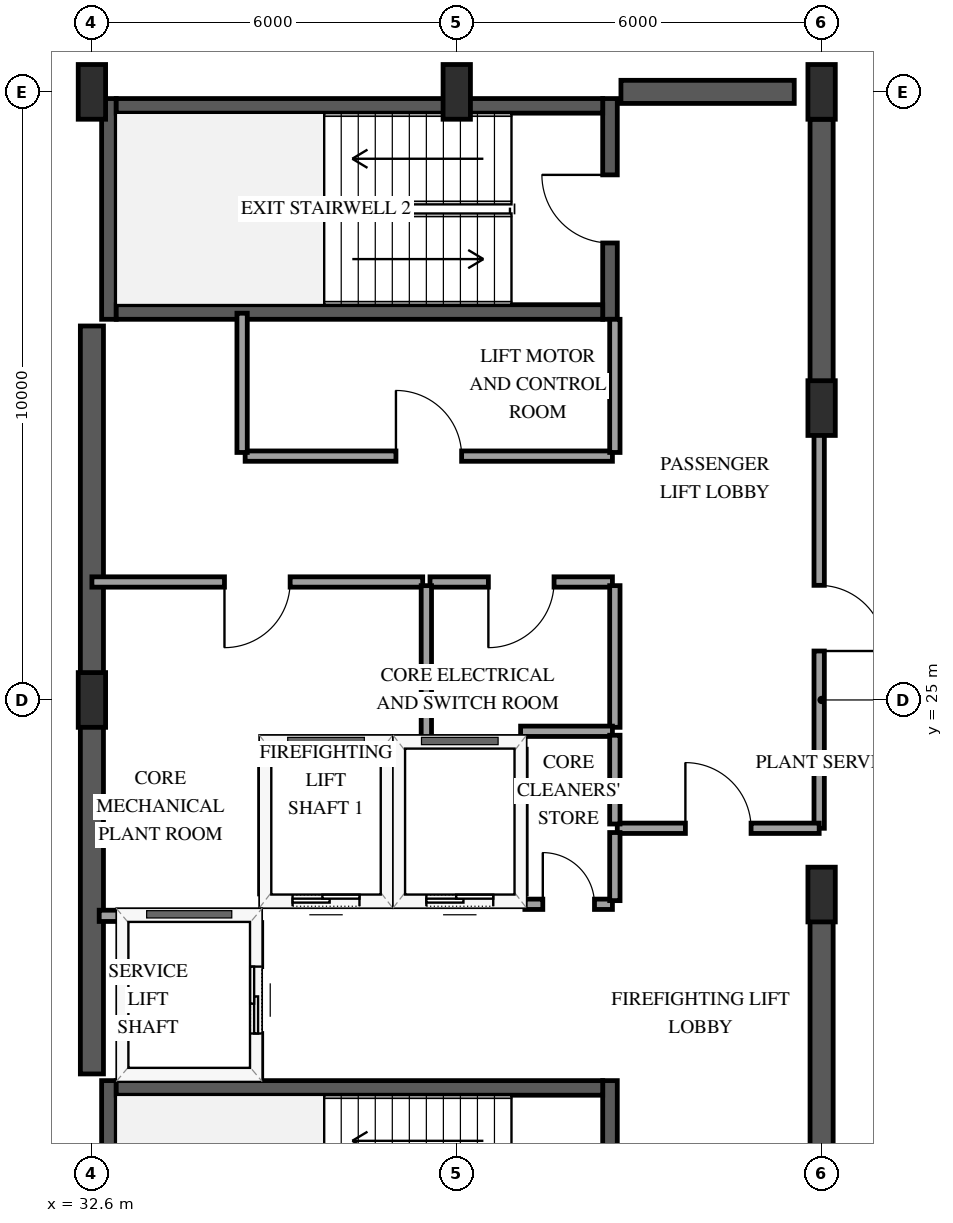
"""IFC4 building model, lengths in metres.
Left out: names, types, materials, properties, quantities, classifications, styles, units other than length and angle.
Written with IfcOpenShell. Run it as: python <this file> out.ifc"""

import sys

from ifc_helpers import new_model, si_unit, direction, frame, frame_2d, origin, origin_2d, place, context, subcontext, project, spatial, rectangle, extrude, element, fill, save


model = new_model("IFC4")
c1 = context("Model", 3, precision=1e-05, world=origin(), true_north=direction((0.0, 1.0)))
c2 = subcontext(c1, "Body", "Model", "MODEL_VIEW")
j1 = project(units=[si_unit("LENGTHUNIT", "METRE"), si_unit("PLANEANGLEUNIT", "RADIAN")], contexts=[c1])
p1 = place(None, origin())
s1 = spatial("IfcSite", under=j1, at=p1, CompositionType="ELEMENT")
p2 = place(p1, origin())
s2 = spatial("IfcBuilding", under=s1, at=p2, CompositionType="ELEMENT")
p3 = place(p2, frame((0.0, 0.0, 305.65)))
s3 = spatial("IfcBuildingStorey", under=s2, at=p3, CompositionType="ELEMENT", Elevation=305.65)
p4 = place(p3, frame((32.88, 15.11, 0.0), z_axis=(0.0, 0.0, 1.0), x_axis=(0.0, 1.0, 0.0)))
e1 = element("IfcWall", 1, at=p4, inside=s3, PredefinedType="SHEAR", context=c2, shape_type="SweptSolid", body=[
    extrude(rectangle(XDim=3.63, YDim=0.24, at=frame_2d((1.815, 0.0))), origin(), (0.0, 0.0, 1.0), 4.2),
])
p5 = place(p3, frame((41.12, 15.11, 0.0), z_axis=(0.0, 0.0, 1.0), x_axis=(0.0, 1.0, 0.0)))
e2 = element("IfcWall", 2, at=p5, inside=s3, PredefinedType="SHEAR", context=c2, shape_type="SweptSolid", body=[
    extrude(rectangle(XDim=3.63, YDim=0.24, at=frame_2d((1.815, 0.0))), origin(), (0.0, 0.0, 1.0), 4.2),
])
p6 = place(p5, frame((1.255, 0.0, 0.0)))
e3 = element("IfcOpeningElement", 3, at=p6, cuts=e2, PredefinedType="OPENING", context=c2, shape_type="SweptSolid", body=[
    extrude(rectangle(XDim=1.12, YDim=2.15, at=frame_2d((0.56, 1.075))), frame((0.0, 0.13, 0.0), z_axis=(0.0, -1.0, 0.0), x_axis=(1.0, 0.0, 0.0)), (0.0, 0.0, 1.0), 0.26),
])
p7 = place(p3, frame((33.0, 18.62, 0.0), z_axis=(0.0, 0.0, 1.0), x_axis=(1.0, 0.0, 0.0)))
e4 = element("IfcWall", 4, at=p7, inside=s3, PredefinedType="SHEAR", context=c2, shape_type="SweptSolid", body=[
    extrude(rectangle(XDim=8.0, YDim=0.24, at=frame_2d((4.0, 0.0))), origin(), (0.0, 0.0, 1.0), 4.2),
])
p8 = place(p3, frame((32.88, 31.26, 0.0), z_axis=(0.0, 0.0, 1.0), x_axis=(0.0, 1.0, 0.0)))
e5 = element("IfcWall", 5, at=p8, inside=s3, PredefinedType="SHEAR", context=c2, shape_type="SweptSolid", body=[
    extrude(rectangle(XDim=3.63, YDim=0.24, at=frame_2d((1.815, 0.0))), origin(), (0.0, 0.0, 1.0), 4.2),
])
p9 = place(p3, frame((41.12, 31.26, 0.0), z_axis=(0.0, 0.0, 1.0), x_axis=(0.0, 1.0, 0.0)))
e6 = element("IfcWall", 6, at=p9, inside=s3, PredefinedType="SHEAR", context=c2, shape_type="SweptSolid", body=[
    extrude(rectangle(XDim=3.63, YDim=0.24, at=frame_2d((1.815, 0.0))), origin(), (0.0, 0.0, 1.0), 4.2),
])
p10 = place(p9, frame((1.255, 0.0, 0.0)))
e7 = element("IfcOpeningElement", 7, at=p10, cuts=e6, PredefinedType="OPENING", context=c2, shape_type="SweptSolid", body=[
    extrude(rectangle(XDim=1.12, YDim=2.15, at=frame_2d((0.56, 1.075))), frame((0.0, 0.13, 0.0), z_axis=(0.0, -1.0, 0.0), x_axis=(1.0, 0.0, 0.0)), (0.0, 0.0, 1.0), 0.26),
])
for number, where, z_axis, x_axis in (
    (8, (33.0, 31.38, 0.0), (0.0, 0.0, 1.0), (1.0, 0.0, 0.0)),
    (9, (33.0, 34.77, 0.0), (0.0, 0.0, 1.0), (1.0, 0.0, 0.0)),
):
    element("IfcWall", number, at=place(p3, frame(where, z_axis=z_axis, x_axis=x_axis)), inside=s3, PredefinedType="SHEAR", context=c2, shape_type="SweptSolid", body=[
        extrude(rectangle(XDim=8.0, YDim=0.24, at=frame_2d((4.0, 0.0))), origin(), (0.0, 0.0, 1.0), 4.2),
    ])
p11 = place(p3, frame((32.6, 18.85, 0.0), z_axis=(0.0, 0.0, 1.0), x_axis=(0.0, 1.0, 0.0)))
e10 = element("IfcWall", 10, at=p11, inside=s3, PredefinedType="SHEAR", context=c2, shape_type="SweptSolid", body=[
    extrude(rectangle(XDim=12.3, YDim=0.38, at=frame_2d((6.15, 0.0))), origin(), (0.0, 0.0, 1.0), 4.2),
])
p12 = place(p3, frame((41.3, 35.0, 0.0), z_axis=(0.0, 0.0, 1.0), x_axis=(1.0, 0.0, 0.0)))
e11 = element("IfcWall", 11, at=p12, inside=s3, PredefinedType="SHEAR", context=c2, shape_type="SweptSolid", body=[
    extrude(rectangle(XDim=2.85, YDim=0.38, at=frame_2d((1.425, 0.0))), origin(), (0.0, 0.0, 1.0), 4.2),
])
p13 = place(p3, frame((44.6, 15.45, 0.0), z_axis=(0.0, 0.0, 1.0), x_axis=(0.0, 1.0, 0.0)))
e12 = element("IfcWall", 12, at=p13, inside=s3, PredefinedType="SHEAR", context=c2, shape_type="SweptSolid", body=[
    extrude(rectangle(XDim=6.35, YDim=0.38, at=frame_2d((3.175, 0.0))), origin(), (0.0, 0.0, 1.0), 4.2),
])
p14 = place(p3, frame((44.6, 29.8, 0.0), z_axis=(0.0, 0.0, 1.0), x_axis=(0.0, 1.0, 0.0)))
e13 = element("IfcWall", 13, at=p14, inside=s3, PredefinedType="SHEAR", context=c2, shape_type="SweptSolid", body=[
    extrude(rectangle(XDim=4.75, YDim=0.38, at=frame_2d((2.375, 0.0))), origin(), (0.0, 0.0, 1.0), 4.2),
])
for number, where, z_axis, x_axis in (
    (14, (32.6, 25.0, 0.0), (0.0, 0.0, 1.0), (1.0, 0.0, 0.0)),
    (15, (32.6, 35.0, 0.0), (0.0, 0.0, 1.0), (1.0, 0.0, 0.0)),
    (16, (38.6, 35.0, 0.0), (0.0, 0.0, 1.0), (1.0, 0.0, 0.0)),
    (17, (44.6, 21.8, 0.0), (0.0, 0.0, 1.0), (1.0, 0.0, 0.0)),
    (18, (44.6, 29.8, 0.0), (0.0, 0.0, 1.0), (1.0, 0.0, 0.0)),
    (19, (44.6, 35.0, 0.0), (0.0, 0.0, 1.0), (1.0, 0.0, 0.0)),
):
    element("IfcColumn", number, at=place(p3, frame(where, z_axis=z_axis, x_axis=x_axis)), inside=s3, PredefinedType="PILASTER", context=c2, shape_type="SweptSolid", body=[
        extrude(rectangle(XDim=0.45, YDim=0.9, at=origin_2d()), origin(), (0.0, 0.0, 1.0), 4.2),
    ])
p15 = place(p3, frame((35.103, 39.234, 0.0), z_axis=(0.0, 0.0, 1.0), x_axis=(-0.794007710978, -0.607907686173, 0.0)))
e20 = element("IfcWall", 20, at=p15, inside=s3, PredefinedType="SOLIDWALL", context=c2, shape_type="SweptSolid", body=[
    extrude(rectangle(XDim=6.831, YDim=0.27, at=frame_2d((3.416, 0.0))), origin(), (0.0, 0.0, 1.0), 3.195),
])
p16 = place(p3, frame((35.45, 21.7, 0.0), z_axis=(0.0, 0.0, 1.0), x_axis=(1.0, 0.0, 0.0)))
e21 = element("IfcWall", 21, at=p16, inside=s3, PredefinedType="SOLIDWALL", context=c2, shape_type="SweptSolid", body=[
    extrude(rectangle(XDim=2.0, YDim=0.185, at=frame_2d((1.0, 0.0))), origin(), (0.0, 0.0, 1.0), 3.895),
])
p17 = place(p16, frame((0.45, 0.0, 0.0)))
e22 = element("IfcOpeningElement", 22, at=p17, cuts=e21, PredefinedType="OPENING", context=c2, shape_type="SweptSolid", body=[
    extrude(rectangle(XDim=1.1, YDim=2.15, at=frame_2d((0.55, 1.075))), frame((0.0, 0.103, 0.0), z_axis=(0.0, -1.0, 0.0), x_axis=(1.0, 0.0, 0.0)), (0.0, 0.0, 1.0), 0.205),
])
p18 = place(p3, frame((35.45, 24.3, 0.0), z_axis=(0.0, 0.0, 1.0), x_axis=(1.0, 0.0, 0.0)))
e23 = element("IfcWall", 23, at=p18, inside=s3, PredefinedType="SOLIDWALL", context=c2, shape_type="SweptSolid", body=[
    extrude(rectangle(XDim=2.0, YDim=0.185, at=frame_2d((1.0, 0.0))), origin(), (0.0, 0.0, 1.0), 3.895),
])
for number, where, z_axis, x_axis in (
    (24, (35.45, 21.81, 0.0), (0.0, 0.0, 1.0), (0.0, 1.0, 0.0)),
    (25, (37.45, 21.81, 0.0), (0.0, 0.0, 1.0), (0.0, 1.0, 0.0)),
):
    element("IfcWall", number, at=place(p3, frame(where, z_axis=z_axis, x_axis=x_axis)), inside=s3, PredefinedType="SOLIDWALL", context=c2, shape_type="SweptSolid", body=[
        extrude(rectangle(XDim=2.38, YDim=0.185, at=frame_2d((1.19, 0.0))), origin(), (0.0, 0.0, 1.0), 3.895),
    ])
p19 = place(p3, frame((37.65, 21.7, 0.0), z_axis=(0.0, 0.0, 1.0), x_axis=(1.0, 0.0, 0.0)))
e26 = element("IfcWall", 26, at=p19, inside=s3, PredefinedType="SOLIDWALL", context=c2, shape_type="SweptSolid", body=[
    extrude(rectangle(XDim=2.0, YDim=0.185, at=frame_2d((1.0, 0.0))), origin(), (0.0, 0.0, 1.0), 3.895),
])
p20 = place(p19, frame((0.45, 0.0, 0.0)))
e27 = element("IfcOpeningElement", 27, at=p20, cuts=e26, PredefinedType="OPENING", context=c2, shape_type="SweptSolid", body=[
    extrude(rectangle(XDim=1.1, YDim=2.15, at=frame_2d((0.55, 1.075))), frame((0.0, 0.103, 0.0), z_axis=(0.0, -1.0, 0.0), x_axis=(1.0, 0.0, 0.0)), (0.0, 0.0, 1.0), 0.205),
])
p21 = place(p3, frame((37.65, 24.3, 0.0), z_axis=(0.0, 0.0, 1.0), x_axis=(1.0, 0.0, 0.0)))
e28 = element("IfcWall", 28, at=p21, inside=s3, PredefinedType="SOLIDWALL", context=c2, shape_type="SweptSolid", body=[
    extrude(rectangle(XDim=2.0, YDim=0.185, at=frame_2d((1.0, 0.0))), origin(), (0.0, 0.0, 1.0), 3.895),
])
p22 = place(p3, frame((39.65, 21.81, 0.0), z_axis=(0.0, 0.0, 1.0), x_axis=(0.0, 1.0, 0.0)))
e29 = element("IfcWall", 29, at=p22, inside=s3, PredefinedType="SOLIDWALL", context=c2, shape_type="SweptSolid", body=[
    extrude(rectangle(XDim=2.38, YDim=0.185, at=frame_2d((1.19, 0.0))), origin(), (0.0, 0.0, 1.0), 3.895),
])
p23 = place(p3, frame((32.72, 21.45, 0.0), z_axis=(0.0, 0.0, 1.0), x_axis=(1.0, 0.0, 0.0)))
e30 = element("IfcWall", 30, at=p23, inside=s3, PredefinedType="SOLIDWALL", context=c2, shape_type="SweptSolid", body=[
    extrude(rectangle(XDim=2.58, YDim=0.185, at=frame_2d((1.29, 0.0))), origin(), (0.0, 0.0, 1.0), 3.895),
])
p24 = place(p3, frame((35.3, 18.79, 0.0), z_axis=(0.0, 0.0, 1.0), x_axis=(0.0, 1.0, 0.0)))
e31 = element("IfcWall", 31, at=p24, inside=s3, PredefinedType="SOLIDWALL", context=c2, shape_type="SweptSolid", body=[
    extrude(rectangle(XDim=2.55, YDim=0.185, at=frame_2d((1.275, 0.0))), origin(), (0.0, 0.0, 1.0), 3.895),
])
p25 = place(p24, frame((0.725, 0.0, 0.0)))
e32 = element("IfcOpeningElement", 32, at=p25, cuts=e31, PredefinedType="OPENING", context=c2, shape_type="SweptSolid", body=[
    extrude(rectangle(XDim=1.1, YDim=2.15, at=frame_2d((0.55, 1.075))), frame((0.0, 0.103, 0.0), z_axis=(0.0, -1.0, 0.0), x_axis=(1.0, 0.0, 0.0)), (0.0, 0.0, 1.0), 0.205),
])
p26 = place(p3, frame((44.56, 29.8, 0.0), z_axis=(0.0, 0.0, 1.0), x_axis=(0.0, -1.0, 0.0)))
e33 = element("IfcWall", 33, at=p26, inside=s3, PredefinedType="PARTITIONING", context=c2, shape_type="SweptSolid", body=[
    extrude(rectangle(XDim=6.91, YDim=0.17, at=frame_2d((3.455, 0.0))), origin(), (0.0, 0.0, 1.0), 2.935),
])
p27 = place(p26, frame((2.915, 0.0, 0.0)))
e34 = element("IfcOpeningElement", 34, at=p27, cuts=e33, PredefinedType="OPENING", context=c2, shape_type="SweptSolid", body=[
    extrude(rectangle(XDim=1.08, YDim=2.15, at=frame_2d((0.54, 1.075))), frame((0.0, 0.095, 0.0), z_axis=(0.0, -1.0, 0.0), x_axis=(1.0, 0.0, 0.0)), (0.0, 0.0, 1.0), 0.19),
])
p28 = place(p3, frame((35.12, 29.01, 0.0), z_axis=(0.0, 0.0, 1.0), x_axis=(1.0, 0.0, 0.0)))
e35 = element("IfcWall", 35, at=p28, inside=s3, PredefinedType="PARTITIONING", context=c2, shape_type="SweptSolid", body=[
    extrude(rectangle(XDim=6.04, YDim=0.17, at=frame_2d((3.02, 0.0))), origin(), (0.0, 0.0, 1.0), 3.895),
])
p29 = place(p28, frame((2.48, 0.0, 0.0)))
e36 = element("IfcOpeningElement", 36, at=p29, cuts=e35, PredefinedType="OPENING", context=c2, shape_type="SweptSolid", body=[
    extrude(rectangle(XDim=1.08, YDim=2.15, at=frame_2d((0.54, 1.075))), frame((0.0, 0.095, 0.0), z_axis=(0.0, -1.0, 0.0), x_axis=(1.0, 0.0, 0.0)), (0.0, 0.0, 1.0), 0.19),
])
p30 = place(p3, frame((38.04, 26.94, 0.0), z_axis=(0.0, 0.0, 1.0), x_axis=(-1.0, 0.0, 0.0)))
e37 = element("IfcWall", 37, at=p30, inside=s3, PredefinedType="PARTITIONING", context=c2, shape_type="SweptSolid", body=[
    extrude(rectangle(XDim=5.44, YDim=0.17, at=frame_2d((2.72, 0.0))), origin(), (0.0, 0.0, 1.0), 3.895),
])
p31 = place(p30, frame((2.18, 0.0, 0.0)))
e38 = element("IfcOpeningElement", 38, at=p31, cuts=e37, PredefinedType="OPENING", context=c2, shape_type="SweptSolid", body=[
    extrude(rectangle(XDim=1.08, YDim=2.15, at=frame_2d((0.54, 1.075))), frame((0.0, 0.095, 0.0), z_axis=(0.0, -1.0, 0.0), x_axis=(1.0, 0.0, 0.0)), (0.0, 0.0, 1.0), 0.19),
])
p32 = place(p3, frame((41.24, 22.89, 0.0), z_axis=(0.0, 0.0, 1.0), x_axis=(1.0, 0.0, 0.0)))
e39 = element("IfcWall", 39, at=p32, inside=s3, PredefinedType="PARTITIONING", context=c2, shape_type="SweptSolid", body=[
    extrude(rectangle(XDim=3.32, YDim=0.17, at=frame_2d((1.66, 0.0))), origin(), (0.0, 0.0, 1.0), 3.895),
])
p33 = place(p32, frame((1.12, 0.0, 0.0)))
e40 = element("IfcOpeningElement", 40, at=p33, cuts=e39, PredefinedType="OPENING", context=c2, shape_type="SweptSolid", body=[
    extrude(rectangle(XDim=1.08, YDim=2.15, at=frame_2d((0.54, 1.075))), frame((0.0, 0.095, 0.0), z_axis=(0.0, -1.0, 0.0), x_axis=(1.0, 0.0, 0.0)), (0.0, 0.0, 1.0), 0.19),
])
p34 = place(p3, frame((41.16, 26.94, 0.0), z_axis=(0.0, 0.0, 1.0), x_axis=(-1.0, 0.0, 0.0)))
e41 = element("IfcWall", 41, at=p34, inside=s3, PredefinedType="PARTITIONING", context=c2, shape_type="SweptSolid", body=[
    extrude(rectangle(XDim=3.0, YDim=0.17, at=frame_2d((1.5, 0.0))), origin(), (0.0, 0.0, 1.0), 3.895),
])
p35 = place(p34, frame((0.96, 0.0, 0.0)))
e42 = element("IfcOpeningElement", 42, at=p35, cuts=e41, PredefinedType="OPENING", context=c2, shape_type="SweptSolid", body=[
    extrude(rectangle(XDim=1.08, YDim=2.15, at=frame_2d((0.54, 1.075))), frame((0.0, 0.095, 0.0), z_axis=(0.0, -1.0, 0.0), x_axis=(1.0, 0.0, 0.0)), (0.0, 0.0, 1.0), 0.19),
])
p36 = place(p3, frame((38.1, 26.88, 0.0), z_axis=(0.0, 0.0, 1.0), x_axis=(0.0, -1.0, 0.0)))
e43 = element("IfcWall", 43, at=p36, inside=s3, PredefinedType="PARTITIONING", context=c2, shape_type="SweptSolid", body=[
    extrude(rectangle(XDim=2.58, YDim=0.17, at=frame_2d((1.29, 0.0))), origin(), (0.0, 0.0, 1.0), 3.895),
])
p37 = place(p3, frame((41.2, 24.55, 0.0), z_axis=(0.0, 0.0, 1.0), x_axis=(0.0, 1.0, 0.0)))
e44 = element("IfcWall", 44, at=p37, inside=s3, PredefinedType="PARTITIONING", context=c2, shape_type="SweptSolid", body=[
    extrude(rectangle(XDim=2.33, YDim=0.17, at=frame_2d((1.165, 0.0))), origin(), (0.0, 0.0, 1.0), 3.895),
])
p38 = place(p3, frame((35.07, 31.36, 0.0), z_axis=(0.0, 0.0, 1.0), x_axis=(0.0, -1.0, 0.0)))
e45 = element("IfcWall", 45, at=p38, inside=s3, PredefinedType="PARTITIONING", context=c2, shape_type="SweptSolid", body=[
    extrude(rectangle(XDim=2.29, YDim=0.17, at=frame_2d((1.145, 0.0))), origin(), (0.0, 0.0, 1.0), 3.895),
])
p39 = place(p3, frame((41.2, 29.07, 0.0), z_axis=(0.0, 0.0, 1.0), x_axis=(0.0, 1.0, 0.0)))
e46 = element("IfcWall", 46, at=p39, inside=s3, PredefinedType="PARTITIONING", context=c2, shape_type="SweptSolid", body=[
    extrude(rectangle(XDim=2.19, YDim=0.17, at=frame_2d((1.095, 0.0))), origin(), (0.0, 0.0, 1.0), 3.895),
])
p40 = place(p3, frame((39.65, 24.485, 0.0), z_axis=(0.0, 0.0, 1.0), x_axis=(1.0, 0.0, 0.0)))
e47 = element("IfcWall", 47, at=p40, inside=s3, PredefinedType="PARTITIONING", context=c2, shape_type="SweptSolid", body=[
    extrude(rectangle(XDim=1.51, YDim=0.17, at=frame_2d((0.755, 0.0))), origin(), (0.0, 0.0, 1.0), 3.895),
])
p41 = place(p3, frame((41.2, 22.96, 0.0), z_axis=(0.0, 0.0, 1.0), x_axis=(0.0, 1.0, 0.0)))
e48 = element("IfcWall", 48, at=p41, inside=s3, PredefinedType="PARTITIONING", context=c2, shape_type="SweptSolid", body=[
    extrude(rectangle(XDim=1.46, YDim=0.17, at=frame_2d((0.73, 0.0))), origin(), (0.0, 0.0, 1.0), 3.895),
])
p42 = place(p3, frame((39.72, 21.64, 0.0), z_axis=(0.0, 0.0, 1.0), x_axis=(1.0, 0.0, 0.0)))
e49 = element("IfcWall", 49, at=p42, inside=s3, PredefinedType="PARTITIONING", context=c2, shape_type="SweptSolid", body=[
    extrude(rectangle(XDim=1.44, YDim=0.17, at=frame_2d((0.72, 0.0))), origin(), (0.0, 0.0, 1.0), 3.895),
])
p43 = place(p42, frame((0.295, 0.0, 0.0)))
e50 = element("IfcOpeningElement", 50, at=p43, cuts=e49, PredefinedType="OPENING", context=c2, shape_type="SweptSolid", body=[
    extrude(rectangle(XDim=0.85, YDim=2.1, at=frame_2d((0.425, 1.05))), frame((0.0, 0.095, 0.0), z_axis=(0.0, -1.0, 0.0), x_axis=(1.0, 0.0, 0.0)), (0.0, 0.0, 1.0), 0.19),
])
p44 = place(p3, frame((41.2, 21.7, 0.0), z_axis=(0.0, 0.0, 1.0), x_axis=(0.0, 1.0, 0.0)))
e51 = element("IfcWall", 51, at=p44, inside=s3, PredefinedType="PARTITIONING", context=c2, shape_type="SweptSolid", body=[
    extrude(rectangle(XDim=1.12, YDim=0.17, at=frame_2d((0.56, 0.0))), origin(), (0.0, 0.0, 1.0), 3.895),
])
p45 = place(p17, origin())
e52 = element("IfcDoor", 52, at=p45, inside=s3, OperationType="SLIDING_TO_LEFT", PredefinedType="DOOR", context=c2, shape_type="SweptSolid", body=[
    extrude(rectangle(XDim=1.1, YDim=2.15, at=frame_2d((0.55, 1.075))), frame((0.0, 0.025, 0.0), z_axis=(0.0, -1.0, 0.0), x_axis=(1.0, 0.0, 0.0)), (0.0, 0.0, 1.0), 0.05),
])
fill(e22, e52)
p46 = place(p20, origin())
e53 = element("IfcDoor", 53, at=p46, inside=s3, OperationType="SLIDING_TO_LEFT", PredefinedType="DOOR", context=c2, shape_type="SweptSolid", body=[
    extrude(rectangle(XDim=1.1, YDim=2.15, at=frame_2d((0.55, 1.075))), frame((0.0, 0.025, 0.0), z_axis=(0.0, -1.0, 0.0), x_axis=(1.0, 0.0, 0.0)), (0.0, 0.0, 1.0), 0.05),
])
fill(e27, e53)
p47 = place(p25, origin())
e54 = element("IfcDoor", 54, at=p47, inside=s3, OperationType="SLIDING_TO_LEFT", PredefinedType="DOOR", context=c2, shape_type="SweptSolid", body=[
    extrude(rectangle(XDim=1.1, YDim=2.15, at=frame_2d((0.55, 1.075))), frame((0.0, 0.025, 0.0), z_axis=(0.0, -1.0, 0.0), x_axis=(1.0, 0.0, 0.0)), (0.0, 0.0, 1.0), 0.05),
])
fill(e32, e54)
p48 = place(p10, origin())
e55 = element("IfcDoor", 55, at=p48, inside=s3, OperationType="SINGLE_SWING_RIGHT", PredefinedType="DOOR", context=c2, shape_type="SweptSolid", body=[
    extrude(rectangle(XDim=1.12, YDim=2.15, at=frame_2d((0.56, 1.075))), frame((0.0, 0.025, 0.0), z_axis=(0.0, -1.0, 0.0), x_axis=(1.0, 0.0, 0.0)), (0.0, 0.0, 1.0), 0.05),
])
fill(e7, e55)
p49 = place(p27, origin())
e56 = element("IfcDoor", 56, at=p49, inside=s3, OperationType="SINGLE_SWING_RIGHT", PredefinedType="DOOR", context=c2, shape_type="SweptSolid", body=[
    extrude(rectangle(XDim=1.08, YDim=2.15, at=frame_2d((0.54, 1.075))), frame((0.0, 0.025, 0.0), z_axis=(0.0, -1.0, 0.0), x_axis=(1.0, 0.0, 0.0)), (0.0, 0.0, 1.0), 0.05),
])
fill(e34, e56)
p50 = place(p29, origin())
e57 = element("IfcDoor", 57, at=p50, inside=s3, OperationType="SINGLE_SWING_LEFT", PredefinedType="DOOR", context=c2, shape_type="SweptSolid", body=[
    extrude(rectangle(XDim=1.08, YDim=2.15, at=frame_2d((0.54, 1.075))), frame((0.0, 0.025, 0.0), z_axis=(0.0, -1.0, 0.0), x_axis=(1.0, 0.0, 0.0)), (0.0, 0.0, 1.0), 0.05),
])
fill(e36, e57)
p51 = place(p31, origin())
e58 = element("IfcDoor", 58, at=p51, inside=s3, OperationType="SINGLE_SWING_RIGHT", PredefinedType="DOOR", context=c2, shape_type="SweptSolid", body=[
    extrude(rectangle(XDim=1.08, YDim=2.15, at=frame_2d((0.54, 1.075))), frame((0.0, 0.025, 0.0), z_axis=(0.0, -1.0, 0.0), x_axis=(1.0, 0.0, 0.0)), (0.0, 0.0, 1.0), 0.05),
])
fill(e38, e58)
p52 = place(p33, origin())
e59 = element("IfcDoor", 59, at=p52, inside=s3, OperationType="SINGLE_SWING_LEFT", PredefinedType="DOOR", context=c2, shape_type="SweptSolid", body=[
    extrude(rectangle(XDim=1.08, YDim=2.15, at=frame_2d((0.54, 1.075))), frame((0.0, 0.025, 0.0), z_axis=(0.0, -1.0, 0.0), x_axis=(1.0, 0.0, 0.0)), (0.0, 0.0, 1.0), 0.05),
])
fill(e40, e59)
p53 = place(p35, origin())
e60 = element("IfcDoor", 60, at=p53, inside=s3, OperationType="SINGLE_SWING_RIGHT", PredefinedType="DOOR", context=c2, shape_type="SweptSolid", body=[
    extrude(rectangle(XDim=1.08, YDim=2.15, at=frame_2d((0.54, 1.075))), frame((0.0, 0.025, 0.0), z_axis=(0.0, -1.0, 0.0), x_axis=(1.0, 0.0, 0.0)), (0.0, 0.0, 1.0), 0.05),
])
fill(e42, e60)
p54 = place(p43, origin())
e61 = element("IfcDoor", 61, at=p54, inside=s3, OperationType="SINGLE_SWING_LEFT", PredefinedType="DOOR", context=c2, shape_type="SweptSolid", body=[
    extrude(rectangle(XDim=0.85, YDim=2.1, at=frame_2d((0.425, 1.05))), frame((0.0, 0.025, 0.0), z_axis=(0.0, -1.0, 0.0), x_axis=(1.0, 0.0, 0.0)), (0.0, 0.0, 1.0), 0.05),
])
fill(e50, e61)
save(model, sys.argv[1])
